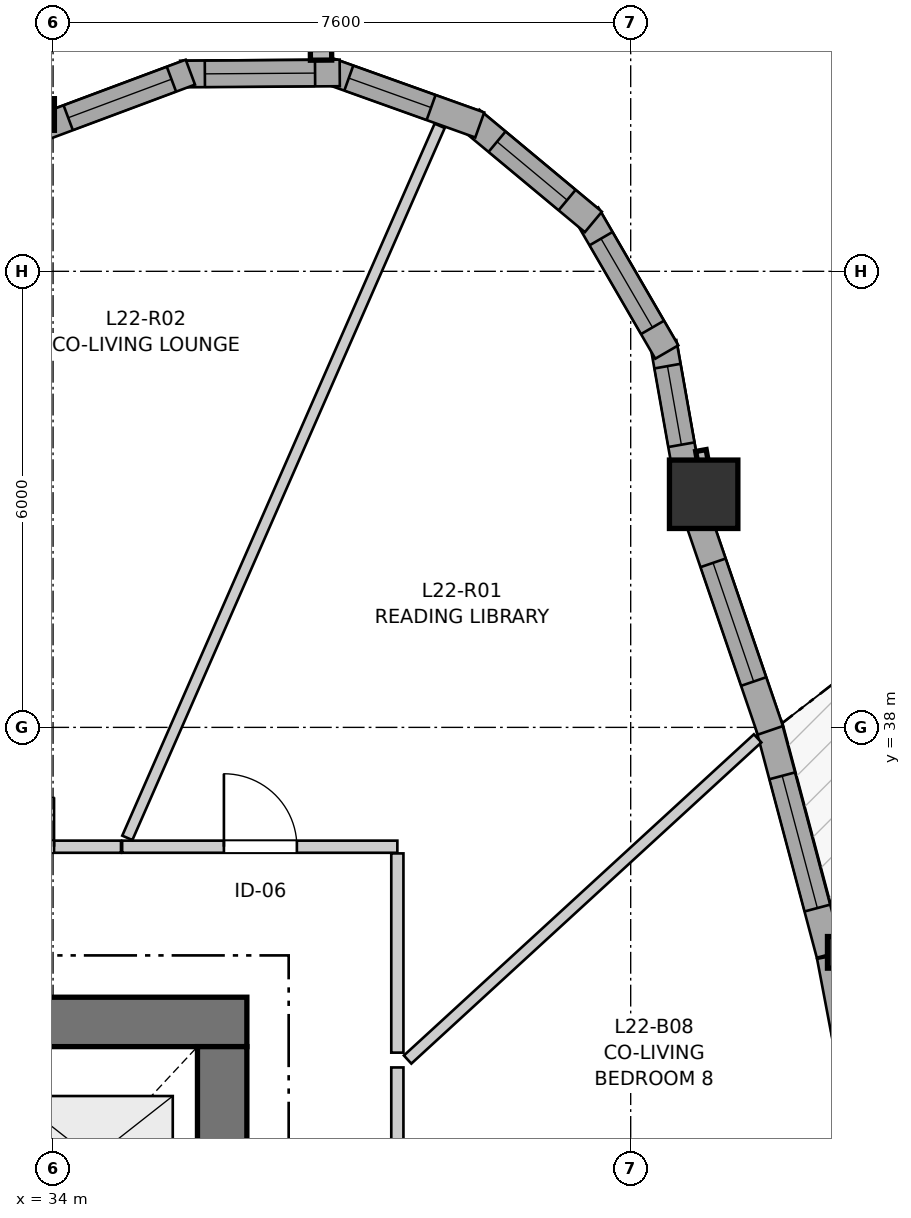
"""IFC4 building model, lengths in metres.
Left out: names, types, materials, properties, quantities, classifications, styles, units other than length and angle.
Written with IfcOpenShell. Run it as: python <this file> out.ifc"""

import sys

from ifc_helpers import new_model, si_unit, direction, frame, frame_2d, origin, origin_2d, place, context, subcontext, project, spatial, rectangle, i_section, extrude, source, transform, mapped, element, fill, save


model = new_model("IFC4")
c1 = context("Model", 3, precision=1e-05, world=origin(), true_north=direction((0.0, 1.0)))
c2 = subcontext(c1, "Body", "Model", "MODEL_VIEW")
j1 = project(units=[si_unit("LENGTHUNIT", "METRE"), si_unit("PLANEANGLEUNIT", "RADIAN")], contexts=[c1])
p1 = place(None, origin())
s1 = spatial("IfcSite", under=j1, at=p1, CompositionType="ELEMENT")
p2 = place(p1, origin())
s2 = spatial("IfcBuilding", under=s1, at=p2, CompositionType="ELEMENT")
p3 = place(p2, frame((0.0, 0.0, 76.8)))
s3 = spatial("IfcBuildingStorey", under=s2, at=p3, CompositionType="ELEMENT", Elevation=76.8)
p4 = place(p3, frame((36.55, 34.125, 0.0), z_axis=(0.0, 0.0, 1.0), x_axis=(-1.0, 0.0, 0.0)))
e1 = element("IfcWall", 1, at=p4, inside=s3, PredefinedType="SHEAR", context=c2, shape_type="SweptSolid", body=[
    extrude(rectangle(XDim=12.4, YDim=0.65, at=frame_2d((6.2, 0.0))), origin(), (0.0, 0.0, 1.0), 2.935),
])
p5 = place(p3, frame((36.225, 18.2, 0.0), z_axis=(0.0, 0.0, 1.0), x_axis=(0.0, 1.0, 0.0)))
e2 = element("IfcWall", 2, at=p5, inside=s3, PredefinedType="SHEAR", context=c2, shape_type="SweptSolid", body=[
    extrude(rectangle(XDim=15.6, YDim=0.65, at=frame_2d((7.8, 0.0))), origin(), (0.0, 0.0, 1.0), 2.935),
])
p6 = place(p5, frame((4.25, 0.0, 0.0)))
e3 = element("IfcOpeningElement", 3, at=p6, cuts=e2, PredefinedType="OPENING", context=c2, shape_type="SweptSolid", body=[
    extrude(rectangle(XDim=1.1, YDim=2.15, at=frame_2d((0.55, 1.075))), frame((0.0, 0.335, 0.0), z_axis=(0.0, -1.0, 0.0), x_axis=(1.0, 0.0, 0.0)), (0.0, 0.0, 1.0), 0.67),
])
p7 = place(p5, frame((10.25, 0.0, 0.0)))
e4 = element("IfcOpeningElement", 4, at=p7, cuts=e2, PredefinedType="OPENING", context=c2, shape_type="SweptSolid", body=[
    extrude(rectangle(XDim=1.1, YDim=2.15, at=frame_2d((0.55, 1.075))), frame((0.0, 0.335, 0.0), z_axis=(0.0, -1.0, 0.0), x_axis=(1.0, 0.0, 0.0)), (0.0, 0.0, 1.0), 0.67),
])
m1 = source(origin(), c2, "Body", "SweptSolid", [
    extrude(i_section(OverallWidth=0.406, OverallDepth=0.416, WebThickness=0.027, FlangeThickness=0.044, FilletRadius=0.015, at=origin_2d()), origin(), (0.0, 0.0, 1.0), 2.935),
])
p8 = place(p3, frame((44.392, 35.04, 0.0), z_axis=(0.0, 0.0, 1.0), x_axis=(1.0, 0.0, 0.0)))
e5 = element("IfcColumn", 5, at=p8, inside=s3, PredefinedType="PILASTER", context=c2, shape_type="MappedRepresentation", body=[
    mapped(m1, transform((0.0, 0.0, 0.0), x_axis=(1.0, 0.0, 0.0), y_axis=(0.0, 1.0, 0.0), z_axis=(0.0, 0.0, 1.0), scale=1.0)),
])
m2 = source(origin(), c2, "Body", "SweptSolid", [
    extrude(rectangle(XDim=0.9, YDim=0.9, at=origin_2d()), origin(), (0.0, 0.0, 1.0), 2.935),
])
p9 = place(p3, frame((42.56, 41.067, 0.0), z_axis=(0.0, 0.0, 1.0), x_axis=(1.0, 0.0, 0.0)))
e6 = element("IfcColumn", 6, at=p9, inside=s3, PredefinedType="COLUMN", context=c2, shape_type="MappedRepresentation", body=[
    mapped(m2, transform((0.0, 0.0, 0.0), x_axis=(1.0, 0.0, 0.0), y_axis=(0.0, 1.0, 0.0), z_axis=(0.0, 0.0, 1.0), scale=1.0)),
])
p10 = place(p3, frame((33.815, 46.063, 0.0), z_axis=(0.0, 0.0, 1.0), x_axis=(1.0, 0.0, 0.0)))
e7 = element("IfcColumn", 7, at=p10, inside=s3, PredefinedType="PILASTER", context=c2, shape_type="MappedRepresentation", body=[
    mapped(m1, transform((0.0, 0.0, 0.0), x_axis=(1.0, 0.0, 0.0), y_axis=(0.0, 1.0, 0.0), z_axis=(0.0, 0.0, 1.0), scale=1.0)),
])
p11 = place(p3, frame((44.8, 31.957, 0.0), z_axis=(0.0, 0.0, 1.0), x_axis=(-0.186672102023, 0.982422274954, 0.0)))
e8 = element("IfcWall", 8, at=p11, inside=s3, PredefinedType="SOLIDWALL", context=c2, shape_type="SweptSolid", body=[
    extrude(rectangle(XDim=3.085, YDim=0.35, at=frame_2d((1.542, 0.0))), origin(), (0.0, 0.0, 1.0), 2.465),
])
p12 = place(p11, frame((0.978, 0.0, 0.82)))
e9 = element("IfcOpeningElement", 9, at=p12, cuts=e8, PredefinedType="OPENING", context=c2, shape_type="SweptSolid", body=[
    extrude(rectangle(XDim=1.15, YDim=1.2, at=frame_2d((0.575, 0.6))), frame((0.0, 0.185, 0.0), z_axis=(0.0, -1.0, 0.0), x_axis=(1.0, 0.0, 0.0)), (0.0, 0.0, 1.0), 0.37),
])
p13 = place(p3, frame((44.218, 35.014, 0.0), z_axis=(0.0, 0.0, 1.0), x_axis=(-0.25705209467, 0.96639754792, 0.0)))
e10 = element("IfcWall", 10, at=p13, inside=s3, PredefinedType="SOLIDWALL", context=c2, shape_type="SweptSolid", body=[
    extrude(rectangle(XDim=3.136, YDim=0.35, at=frame_2d((1.568, 0.0))), origin(), (0.0, 0.0, 1.0), 2.465),
])
p14 = place(p13, frame((0.63, 0.0, 0.82)))
e11 = element("IfcOpeningElement", 11, at=p14, cuts=e10, PredefinedType="OPENING", context=c2, shape_type="SweptSolid", body=[
    extrude(rectangle(XDim=1.8, YDim=1.45, at=frame_2d((0.9, 0.725))), frame((0.0, 0.185, 0.0), z_axis=(0.0, -1.0, 0.0), x_axis=(1.0, 0.0, 0.0)), (0.0, 0.0, 1.0), 0.37),
])
p15 = place(p3, frame((43.437, 37.961, 0.0), z_axis=(0.0, 0.0, 1.0), x_axis=(-0.323572555921, 0.946203361363, 0.0)))
e12 = element("IfcWall", 12, at=p15, inside=s3, PredefinedType="SOLIDWALL", context=c2, shape_type="SweptSolid", body=[
    extrude(rectangle(XDim=2.998, YDim=0.35, at=frame_2d((1.499, 0.0))), origin(), (0.0, 0.0, 1.0), 2.465),
])
p16 = place(p15, frame((0.679, 0.0, 0.82)))
e13 = element("IfcOpeningElement", 13, at=p16, cuts=e12, PredefinedType="OPENING", context=c2, shape_type="SweptSolid", body=[
    extrude(rectangle(XDim=1.65, YDim=1.45, at=frame_2d((0.825, 0.725))), frame((0.0, 0.185, 0.0), z_axis=(0.0, -1.0, 0.0), x_axis=(1.0, 0.0, 0.0)), (0.0, 0.0, 1.0), 0.37),
])
p17 = place(p3, frame((42.348, 41.258, 0.0), z_axis=(0.0, 0.0, 1.0), x_axis=(-0.174331490339, 0.984687022092, 0.0)))
e14 = element("IfcWall", 14, at=p17, inside=s3, PredefinedType="SOLIDWALL", context=c2, shape_type="SweptSolid", body=[
    extrude(rectangle(XDim=1.836, YDim=0.35, at=frame_2d((0.918, 0.0))), origin(), (0.0, 0.0, 1.0), 2.465),
])
p18 = place(p17, frame((0.468, 0.0, 0.82)))
e15 = element("IfcOpeningElement", 15, at=p18, cuts=e14, PredefinedType="OPENING", context=c2, shape_type="SweptSolid", body=[
    extrude(rectangle(XDim=1.05, YDim=1.45, at=frame_2d((0.525, 0.725))), frame((0.0, 0.185, 0.0), z_axis=(0.0, -1.0, 0.0), x_axis=(1.0, 0.0, 0.0)), (0.0, 0.0, 1.0), 0.37),
])
p19 = place(p3, frame((42.075, 42.938, 0.0), z_axis=(0.0, 0.0, 1.0), x_axis=(-0.501902596059, 0.864924149315, 0.0)))
e16 = element("IfcWall", 16, at=p19, inside=s3, PredefinedType="SOLIDWALL", context=c2, shape_type="SweptSolid", body=[
    extrude(rectangle(XDim=2.099, YDim=0.35, at=frame_2d((1.049, 0.0))), origin(), (0.0, 0.0, 1.0), 2.465),
])
p20 = place(p19, frame((0.375, 0.0, 0.82)))
e17 = element("IfcOpeningElement", 17, at=p20, cuts=e16, PredefinedType="OPENING", context=c2, shape_type="SweptSolid", body=[
    extrude(rectangle(XDim=1.35, YDim=1.45, at=frame_2d((0.675, 0.725))), frame((0.0, 0.185, 0.0), z_axis=(0.0, -1.0, 0.0), x_axis=(1.0, 0.0, 0.0)), (0.0, 0.0, 1.0), 0.37),
])
p21 = place(p3, frame((41.109, 44.65, 0.0), z_axis=(0.0, 0.0, 1.0), x_axis=(-0.768450068703, 0.639909752942, 0.0)))
e18 = element("IfcWall", 18, at=p21, inside=s3, PredefinedType="SOLIDWALL", context=c2, shape_type="SweptSolid", body=[
    extrude(rectangle(XDim=2.099, YDim=0.35, at=frame_2d((1.049, 0.0))), origin(), (0.0, 0.0, 1.0), 2.465),
])
p22 = place(p21, frame((0.449, 0.0, 0.82)))
e19 = element("IfcOpeningElement", 19, at=p22, cuts=e18, PredefinedType="OPENING", context=c2, shape_type="SweptSolid", body=[
    extrude(rectangle(XDim=1.2, YDim=1.45, at=frame_2d((0.6, 0.725))), frame((0.0, 0.185, 0.0), z_axis=(0.0, -1.0, 0.0), x_axis=(1.0, 0.0, 0.0)), (0.0, 0.0, 1.0), 0.37),
])
p23 = place(p3, frame((39.614, 45.925, 0.0), z_axis=(0.0, 0.0, 1.0), x_axis=(-0.941486401639, 0.33705096874, 0.0)))
e20 = element("IfcWall", 20, at=p23, inside=s3, PredefinedType="SOLIDWALL", context=c2, shape_type="SweptSolid", body=[
    extrude(rectangle(XDim=2.099, YDim=0.35, at=frame_2d((1.05, 0.0))), origin(), (0.0, 0.0, 1.0), 2.465),
])
p24 = place(p23, frame((0.68, 0.0, 0.82)))
e21 = element("IfcOpeningElement", 21, at=p24, cuts=e20, PredefinedType="OPENING", context=c2, shape_type="SweptSolid", body=[
    extrude(rectangle(XDim=1.15, YDim=1.2, at=frame_2d((0.575, 0.6))), frame((0.0, 0.185, 0.0), z_axis=(0.0, -1.0, 0.0), x_axis=(1.0, 0.0, 0.0)), (0.0, 0.0, 1.0), 0.37),
])
p25 = place(p3, frame((37.772, 46.61, 0.0), z_axis=(0.0, 0.0, 1.0), x_axis=(-0.999976451414, -0.006862697526, 0.0)))
e22 = element("IfcWall", 22, at=p25, inside=s3, PredefinedType="SOLIDWALL", context=c2, shape_type="SweptSolid", body=[
    extrude(rectangle(XDim=2.099, YDim=0.35, at=frame_2d((1.049, 0.0))), origin(), (0.0, 0.0, 1.0), 2.465),
])
p26 = place(p25, frame((0.324, 0.0, 0.82)))
e23 = element("IfcOpeningElement", 23, at=p26, cuts=e22, PredefinedType="OPENING", context=c2, shape_type="SweptSolid", body=[
    extrude(rectangle(XDim=1.45, YDim=1.25, at=frame_2d((0.725, 0.625))), frame((0.0, 0.185, 0.0), z_axis=(0.0, -1.0, 0.0), x_axis=(1.0, 0.0, 0.0)), (0.0, 0.0, 1.0), 0.37),
])
p27 = place(p3, frame((35.806, 46.62, 0.0), z_axis=(0.0, 0.0, 1.0), x_axis=(-0.936863987578, -0.34969396446, 0.0)))
e24 = element("IfcWall", 24, at=p27, inside=s3, PredefinedType="SOLIDWALL", context=c2, shape_type="SweptSolid", body=[
    extrude(rectangle(XDim=2.041, YDim=0.35, at=frame_2d((1.021, 0.0))), origin(), (0.0, 0.0, 1.0), 2.465),
])
p28 = place(p27, frame((0.265, 0.0, 0.82)))
e25 = element("IfcOpeningElement", 25, at=p28, cuts=e24, PredefinedType="OPENING", context=c2, shape_type="SweptSolid", body=[
    extrude(rectangle(XDim=1.45, YDim=1.25, at=frame_2d((0.725, 0.625))), frame((0.0, 0.185, 0.0), z_axis=(0.0, -1.0, 0.0), x_axis=(1.0, 0.0, 0.0)), (0.0, 0.0, 1.0), 0.37),
])
p29 = place(p3, frame((38.53, 33.526, 0.0), z_axis=(0.0, 0.0, 1.0), x_axis=(0.0, -1.0, 0.0)))
e26 = element("IfcWall", 26, at=p29, inside=s3, PredefinedType="PARTITIONING", context=c2, shape_type="SweptSolid", body=[
    extrude(rectangle(XDim=5.472, YDim=0.16, at=frame_2d((2.736, 0.0))), origin(), (0.0, 0.0, 1.0), 2.935),
])
p30 = place(p29, frame((2.278, 0.0, 0.0)))
e27 = element("IfcOpeningElement", 27, at=p30, cuts=e26, PredefinedType="OPENING", context=c2, shape_type="SweptSolid", body=[
    extrude(rectangle(XDim=0.92, YDim=2.1, at=frame_2d((0.46, 1.05))), frame((0.0, 0.09, 0.0), z_axis=(0.0, -1.0, 0.0), x_axis=(1.0, 0.0, 0.0)), (0.0, 0.0, 1.0), 0.18),
])
p31 = place(p3, frame((34.909, 36.43, 0.0), z_axis=(0.0, 0.0, 1.0), x_axis=(1.0, 0.0, 0.0)))
e28 = element("IfcWall", 28, at=p31, inside=s3, PredefinedType="PARTITIONING", context=c2, shape_type="SweptSolid", body=[
    extrude(rectangle(XDim=3.621, YDim=0.16, at=frame_2d((1.811, 0.0))), origin(), (0.0, 0.0, 1.0), 2.573),
])
p32 = place(p31, frame((1.339, 0.0, 0.0)))
e29 = element("IfcOpeningElement", 29, at=p32, cuts=e28, PredefinedType="OPENING", context=c2, shape_type="SweptSolid", body=[
    extrude(rectangle(XDim=0.96, YDim=2.1, at=frame_2d((0.48, 1.05))), frame((0.0, 0.09, 0.0), z_axis=(0.0, -1.0, 0.0), x_axis=(1.0, 0.0, 0.0)), (0.0, 0.0, 1.0), 0.18),
])
p33 = place(p3, frame((31.785, 36.43, 0.0), z_axis=(0.0, 0.0, 1.0), x_axis=(1.0, 0.0, 0.0)))
e30 = element("IfcWall", 30, at=p33, inside=s3, PredefinedType="PARTITIONING", context=c2, shape_type="SweptSolid", body=[
    extrude(rectangle(XDim=3.109, YDim=0.16, at=frame_2d((1.555, 0.0))), origin(), (0.0, 0.0, 1.0), 2.935),
])
p34 = place(p33, frame((0.928, 0.0, 0.0)))
e31 = element("IfcOpeningElement", 31, at=p34, cuts=e30, PredefinedType="OPENING", context=c2, shape_type="SweptSolid", body=[
    extrude(rectangle(XDim=1.3, YDim=2.1, at=frame_2d((0.65, 1.05))), frame((0.0, 0.09, 0.0), z_axis=(0.0, -1.0, 0.0), x_axis=(1.0, 0.0, 0.0)), (0.0, 0.0, 1.0), 0.18),
])
p35 = place(p3, frame((34.977, 36.546, 0.0), z_axis=(0.0, 0.0, 1.0), x_axis=(0.40175384449, 0.915747699117, 0.0)))
e32 = element("IfcWall", 32, at=p35, inside=s3, PredefinedType="PARTITIONING", context=c2, shape_type="SweptSolid", body=[
    extrude(rectangle(XDim=10.23, YDim=0.145, at=frame_2d((5.115, 0.0))), origin(), (0.0, 0.0, 1.0), 2.935),
])
p36 = place(p3, frame((38.665, 33.63, 0.0), z_axis=(0.0, 0.0, 1.0), x_axis=(0.736824900837, 0.676083623161, 0.0)))
e33 = element("IfcWall", 33, at=p36, inside=s3, PredefinedType="PARTITIONING", context=c2, shape_type="SweptSolid", body=[
    extrude(rectangle(XDim=6.25, YDim=0.145, at=frame_2d((3.125, 0.0))), origin(), (0.0, 0.0, 1.0), 2.935),
])
p37 = place(p3, frame((38.53, 33.721, 0.0), z_axis=(0.0, 0.0, 1.0), x_axis=(0.0, 1.0, 0.0)))
e34 = element("IfcWall", 34, at=p37, inside=s3, PredefinedType="PARTITIONING", context=c2, shape_type="SweptSolid", body=[
    extrude(rectangle(XDim=2.621, YDim=0.16, at=frame_2d((1.311, 0.0))), origin(), (0.0, 0.0, 1.0), 2.573),
])
m3 = source(origin(), c2, "Body", "SweptSolid", [
    extrude(rectangle(XDim=1.8, YDim=1.45, at=frame_2d((0.9, 0.725))), frame((0.0, 0.03, 0.0), z_axis=(0.0, -1.0, 0.0), x_axis=(1.0, 0.0, 0.0)), (0.0, 0.0, 1.0), 0.06),
])
p38 = place(p14, origin())
e35 = element("IfcWindow", 35, at=p38, inside=s3, PartitioningType="SINGLE_PANEL", PredefinedType="WINDOW", context=c2, shape_type="MappedRepresentation", body=[
    mapped(m3, transform((0.0, 0.0, 0.0), x_axis=(1.0, 0.0, 0.0), y_axis=(0.0, 1.0, 0.0), z_axis=(0.0, 0.0, 1.0), scale=1.0)),
])
fill(e11, e35)
m4 = source(origin(), c2, "Body", "SweptSolid", [
    extrude(rectangle(XDim=1.65, YDim=1.45, at=frame_2d((0.825, 0.725))), frame((0.0, 0.03, 0.0), z_axis=(0.0, -1.0, 0.0), x_axis=(1.0, 0.0, 0.0)), (0.0, 0.0, 1.0), 0.06),
])
p39 = place(p16, origin())
e36 = element("IfcWindow", 36, at=p39, inside=s3, PartitioningType="SINGLE_PANEL", PredefinedType="WINDOW", context=c2, shape_type="MappedRepresentation", body=[
    mapped(m4, transform((0.0, 0.0, 0.0), x_axis=(1.0, 0.0, 0.0), y_axis=(0.0, 1.0, 0.0), z_axis=(0.0, 0.0, 1.0), scale=1.0)),
])
fill(e13, e36)
m5 = source(origin(), c2, "Body", "SweptSolid", [
    extrude(rectangle(XDim=1.05, YDim=1.45, at=frame_2d((0.525, 0.725))), frame((0.0, 0.03, 0.0), z_axis=(0.0, -1.0, 0.0), x_axis=(1.0, 0.0, 0.0)), (0.0, 0.0, 1.0), 0.06),
])
p40 = place(p18, origin())
e37 = element("IfcWindow", 37, at=p40, inside=s3, PartitioningType="SINGLE_PANEL", PredefinedType="WINDOW", context=c2, shape_type="MappedRepresentation", body=[
    mapped(m5, transform((0.0, 0.0, 0.0), x_axis=(1.0, 0.0, 0.0), y_axis=(0.0, 1.0, 0.0), z_axis=(0.0, 0.0, 1.0), scale=1.0)),
])
fill(e15, e37)
m6 = source(origin(), c2, "Body", "SweptSolid", [
    extrude(rectangle(XDim=1.35, YDim=1.45, at=frame_2d((0.675, 0.725))), frame((0.0, 0.03, 0.0), z_axis=(0.0, -1.0, 0.0), x_axis=(1.0, 0.0, 0.0)), (0.0, 0.0, 1.0), 0.06),
])
p41 = place(p20, origin())
e38 = element("IfcWindow", 38, at=p41, inside=s3, PartitioningType="SINGLE_PANEL", PredefinedType="WINDOW", context=c2, shape_type="MappedRepresentation", body=[
    mapped(m6, transform((0.0, 0.0, 0.0), x_axis=(1.0, 0.0, 0.0), y_axis=(0.0, 1.0, 0.0), z_axis=(0.0, 0.0, 1.0), scale=1.0)),
])
fill(e17, e38)
m7 = source(origin(), c2, "Body", "SweptSolid", [
    extrude(rectangle(XDim=1.2, YDim=1.45, at=frame_2d((0.6, 0.725))), frame((0.0, 0.03, 0.0), z_axis=(0.0, -1.0, 0.0), x_axis=(1.0, 0.0, 0.0)), (0.0, 0.0, 1.0), 0.06),
])
p42 = place(p22, origin())
e39 = element("IfcWindow", 39, at=p42, inside=s3, PartitioningType="SINGLE_PANEL", PredefinedType="WINDOW", context=c2, shape_type="MappedRepresentation", body=[
    mapped(m7, transform((0.0, 0.0, 0.0), x_axis=(1.0, 0.0, 0.0), y_axis=(0.0, 1.0, 0.0), z_axis=(0.0, 0.0, 1.0), scale=1.0)),
])
fill(e19, e39)
m8 = source(origin(), c2, "Body", "SweptSolid", [
    extrude(rectangle(XDim=1.15, YDim=1.2, at=frame_2d((0.575, 0.6))), frame((0.0, 0.03, 0.0), z_axis=(0.0, -1.0, 0.0), x_axis=(1.0, 0.0, 0.0)), (0.0, 0.0, 1.0), 0.06),
])
p43 = place(p24, origin())
e40 = element("IfcWindow", 40, at=p43, inside=s3, PartitioningType="SINGLE_PANEL", PredefinedType="WINDOW", context=c2, shape_type="MappedRepresentation", body=[
    mapped(m8, transform((0.0, 0.0, 0.0), x_axis=(1.0, 0.0, 0.0), y_axis=(0.0, 1.0, 0.0), z_axis=(0.0, 0.0, 1.0), scale=1.0)),
])
fill(e21, e40)
m9 = source(origin(), c2, "Body", "SweptSolid", [
    extrude(rectangle(XDim=1.45, YDim=1.25, at=frame_2d((0.725, 0.625))), frame((0.0, 0.03, 0.0), z_axis=(0.0, -1.0, 0.0), x_axis=(1.0, 0.0, 0.0)), (0.0, 0.0, 1.0), 0.06),
])
p44 = place(p26, origin())
e41 = element("IfcWindow", 41, at=p44, inside=s3, PartitioningType="SINGLE_PANEL", PredefinedType="WINDOW", context=c2, shape_type="MappedRepresentation", body=[
    mapped(m9, transform((0.0, 0.0, 0.0), x_axis=(1.0, 0.0, 0.0), y_axis=(0.0, 1.0, 0.0), z_axis=(0.0, 0.0, 1.0), scale=1.0)),
])
fill(e23, e41)
p45 = place(p28, origin())
e42 = element("IfcWindow", 42, at=p45, inside=s3, PartitioningType="SINGLE_PANEL", PredefinedType="WINDOW", context=c2, shape_type="MappedRepresentation", body=[
    mapped(m9, transform((0.0, 0.0, 0.0), x_axis=(1.0, 0.0, 0.0), y_axis=(0.0, 1.0, 0.0), z_axis=(0.0, 0.0, 1.0), scale=1.0)),
])
fill(e25, e42)
m10 = source(origin(), c2, "Body", "SweptSolid", [
    extrude(rectangle(XDim=0.96, YDim=2.1, at=frame_2d((0.48, 1.05))), frame((0.0, 0.025, 0.0), z_axis=(0.0, -1.0, 0.0), x_axis=(1.0, 0.0, 0.0)), (0.0, 0.0, 1.0), 0.05),
])
p46 = place(p32, origin())
e43 = element("IfcDoor", 43, at=p46, inside=s3, OperationType="SINGLE_SWING_LEFT", PredefinedType="DOOR", context=c2, shape_type="MappedRepresentation", body=[
    mapped(m10, transform((0.0, 0.0, 0.0), x_axis=(1.0, 0.0, 0.0), y_axis=(0.0, 1.0, 0.0), z_axis=(0.0, 0.0, 1.0), scale=1.0)),
])
fill(e29, e43)
m11 = source(origin(), c2, "Body", "SweptSolid", [
    extrude(rectangle(XDim=1.3, YDim=2.1, at=frame_2d((0.65, 1.05))), frame((0.0, 0.025, 0.0), z_axis=(0.0, -1.0, 0.0), x_axis=(1.0, 0.0, 0.0)), (0.0, 0.0, 1.0), 0.05),
])
p47 = place(p34, origin())
e44 = element("IfcDoor", 44, at=p47, inside=s3, OperationType="DOUBLE_DOOR_SINGLE_SWING", PredefinedType="DOOR", context=c2, shape_type="MappedRepresentation", body=[
    mapped(m11, transform((0.0, 0.0, 0.0), x_axis=(1.0, 0.0, 0.0), y_axis=(0.0, 1.0, 0.0), z_axis=(0.0, 0.0, 1.0), scale=1.0)),
])
fill(e31, e44)
save(model, sys.argv[1])
